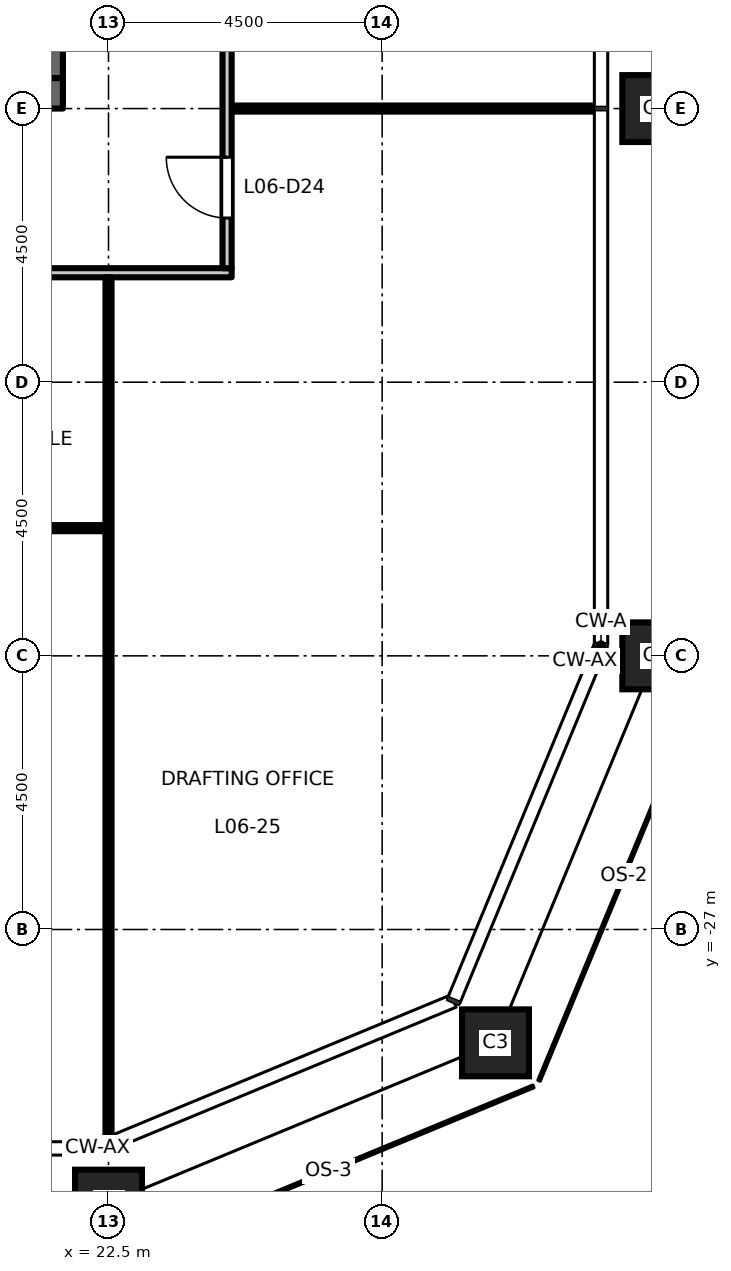
"""IFC4 building model, lengths in metres.
Left out: names, types, materials, properties, quantities, classifications, styles, units other than length and angle.
Written with IfcOpenShell. Run it as: python <this file> out.ifc"""

import sys

from ifc_helpers import new_model, si_unit, direction, frame, frame_2d, origin, origin_2d, place, context, subcontext, project, spatial, rectangle, hollow_rectangle, extrude, element, fill, save


model = new_model("IFC4")
c1 = context("Model", 3, precision=1e-05, world=origin(), true_north=direction((0.0, 1.0)))
c2 = subcontext(c1, "Body", "Model", "MODEL_VIEW")
j1 = project(units=[si_unit("LENGTHUNIT", "METRE"), si_unit("PLANEANGLEUNIT", "RADIAN")], contexts=[c1])
p1 = place(None, origin())
s1 = spatial("IfcSite", under=j1, at=p1, CompositionType="ELEMENT")
p2 = place(p1, origin())
s2 = spatial("IfcBuilding", under=s1, at=p2, CompositionType="ELEMENT")
p3 = place(p2, frame((0.0, 0.0, 31.2)))
s3 = spatial("IfcBuildingStorey", under=s2, at=p3, CompositionType="ELEMENT", Elevation=31.2)
for number, where, z_axis, x_axis in (
    (1, (22.5, -31.5, 0.0), (0.0, 0.0, 1.0), (1.0, 0.0, 0.0)),
    (2, (28.864, -28.864, 0.0), (0.0, 0.0, 1.0), (1.0, 0.0, 0.0)),
    (3, (31.5, -22.5, 0.0), (0.0, 0.0, 1.0), (1.0, 0.0, 0.0)),
    (4, (31.5, -13.5, 0.0), (0.0, 0.0, 1.0), (1.0, 0.0, 0.0)),
):
    element("IfcColumn", number, at=place(p3, frame(where, z_axis=z_axis, x_axis=x_axis)), inside=s3, PredefinedType="COLUMN", context=c2, shape_type="SweptSolid", body=[
        extrude(hollow_rectangle(XDim=1.1, YDim=1.1, WallThickness=0.07, at=origin_2d()), origin(), (0.0, 0.0, 1.0), 4.5),
    ])
p4 = place(p3, frame((21.5, -13.0, 0.0), z_axis=(0.0, 0.0, 1.0), x_axis=(0.0, 1.0, 0.0)))
e5 = element("IfcWall", 5, at=p4, inside=s3, PredefinedType="SHEAR", context=c2, shape_type="SweptSolid", body=[
    extrude(rectangle(XDim=26.0, YDim=0.5, at=frame_2d((13.0, 0.0))), origin(), (0.0, 0.0, 1.0), 4.35),
])
p5 = place(p4, frame((16.825, 0.0, 0.0)))
e6 = element("IfcOpeningElement", 6, at=p5, cuts=e5, PredefinedType="OPENING", context=c2, shape_type="SweptSolid", body=[
    extrude(rectangle(XDim=1.8, YDim=2.1, at=frame_2d((0.9, 1.05))), frame((0.0, 0.26, 0.0), z_axis=(0.0, -1.0, 0.0), x_axis=(1.0, 0.0, 0.0)), (0.0, 0.0, 1.0), 0.52),
])
p6 = place(p4, frame((7.375, 0.0, 0.0)))
e7 = element("IfcOpeningElement", 7, at=p6, cuts=e5, PredefinedType="OPENING", context=c2, shape_type="SweptSolid", body=[
    extrude(rectangle(XDim=1.8, YDim=2.1, at=frame_2d((0.9, 1.05))), frame((0.0, 0.26, 0.0), z_axis=(0.0, -1.0, 0.0), x_axis=(1.0, 0.0, 0.0)), (0.0, 0.0, 1.0), 0.52),
])
p7 = place(p4, frame((23.4, 0.0, 0.0)))
e8 = element("IfcOpeningElement", 8, at=p7, cuts=e5, PredefinedType="OPENING", context=c2, shape_type="SweptSolid", body=[
    extrude(rectangle(XDim=0.9, YDim=2.1, at=frame_2d((0.45, 1.05))), frame((0.0, 0.26, 0.0), z_axis=(0.0, -1.0, 0.0), x_axis=(1.0, 0.0, 0.0)), (0.0, 0.0, 1.0), 0.52),
])
p8 = place(p3, frame((8.25, -13.25, 0.0), z_axis=(0.0, 0.0, 1.0), x_axis=(1.0, 0.0, 0.0)))
e9 = element("IfcWall", 9, at=p8, inside=s3, PredefinedType="SHEAR", context=c2, shape_type="SweptSolid", body=[
    extrude(rectangle(XDim=13.5, YDim=0.5, at=frame_2d((6.75, 0.0))), origin(), (0.0, 0.0, 1.0), 4.35),
])
p9 = place(p3, frame((4.55, -20.4, 0.0), z_axis=(0.0, 0.0, 1.0), x_axis=(1.0, 0.0, 0.0)))
e10 = element("IfcWall", 10, at=p9, inside=s3, PredefinedType="PARTITIONING", context=c2, shape_type="SweptSolid", body=[
    extrude(rectangle(XDim=17.9, YDim=0.1, at=frame_2d((8.95, 0.0))), origin(), (0.0, 0.0, 1.0), 4.35),
])
p10 = place(p9, frame((3.85, 0.0, 0.0)))
e11 = element("IfcOpeningElement", 11, at=p10, cuts=e10, PredefinedType="OPENING", context=c2, shape_type="SweptSolid", body=[
    extrude(rectangle(XDim=1.0, YDim=2.1, at=frame_2d((0.5, 1.05))), frame((0.0, 0.06, 0.0), z_axis=(0.0, -1.0, 0.0), x_axis=(1.0, 0.0, 0.0)), (0.0, 0.0, 1.0), 0.12),
])
p11 = place(p9, frame((12.85, 0.0, 0.0)))
e12 = element("IfcOpeningElement", 12, at=p11, cuts=e10, PredefinedType="OPENING", context=c2, shape_type="SweptSolid", body=[
    extrude(rectangle(XDim=1.0, YDim=2.1, at=frame_2d((0.5, 1.05))), frame((0.0, 0.06, 0.0), z_axis=(0.0, -1.0, 0.0), x_axis=(1.0, 0.0, 0.0)), (0.0, 0.0, 1.0), 0.12),
])
p12 = place(p3, frame((-24.525, -16.2, 0.0), z_axis=(0.0, 0.0, 1.0), x_axis=(1.0, 0.0, 0.0)))
e13 = element("IfcWall", 13, at=p12, inside=s3, PredefinedType="PARTITIONING", context=c2, shape_type="SweptSolid", body=[
    extrude(rectangle(XDim=49.05, YDim=0.15, at=frame_2d((24.525, 0.0))), origin(), (0.0, 0.0, 1.0), 4.35),
])
p13 = place(p12, frame((5.925, 0.0, 0.0)))
e14 = element("IfcOpeningElement", 14, at=p13, cuts=e13, PredefinedType="OPENING", context=c2, shape_type="SweptSolid", body=[
    extrude(rectangle(XDim=1.0, YDim=2.1, at=frame_2d((0.5, 1.05))), frame((0.0, 0.085, 0.0), z_axis=(0.0, -1.0, 0.0), x_axis=(1.0, 0.0, 0.0)), (0.0, 0.0, 1.0), 0.17),
])
p14 = place(p12, frame((14.925, 0.0, 0.0)))
e15 = element("IfcOpeningElement", 15, at=p14, cuts=e13, PredefinedType="OPENING", context=c2, shape_type="SweptSolid", body=[
    extrude(rectangle(XDim=1.0, YDim=2.1, at=frame_2d((0.5, 1.05))), frame((0.0, 0.085, 0.0), z_axis=(0.0, -1.0, 0.0), x_axis=(1.0, 0.0, 0.0)), (0.0, 0.0, 1.0), 0.17),
])
p15 = place(p12, frame((23.925, 0.0, 0.0)))
e16 = element("IfcOpeningElement", 16, at=p15, cuts=e13, PredefinedType="OPENING", context=c2, shape_type="SweptSolid", body=[
    extrude(rectangle(XDim=1.0, YDim=2.1, at=frame_2d((0.5, 1.05))), frame((0.0, 0.085, 0.0), z_axis=(0.0, -1.0, 0.0), x_axis=(1.0, 0.0, 0.0)), (0.0, 0.0, 1.0), 0.17),
])
p16 = place(p12, frame((32.925, 0.0, 0.0)))
e17 = element("IfcOpeningElement", 17, at=p16, cuts=e13, PredefinedType="OPENING", context=c2, shape_type="SweptSolid", body=[
    extrude(rectangle(XDim=1.0, YDim=2.1, at=frame_2d((0.5, 1.05))), frame((0.0, 0.085, 0.0), z_axis=(0.0, -1.0, 0.0), x_axis=(1.0, 0.0, 0.0)), (0.0, 0.0, 1.0), 0.17),
])
p17 = place(p12, frame((41.925, 0.0, 0.0)))
e18 = element("IfcOpeningElement", 18, at=p17, cuts=e13, PredefinedType="OPENING", context=c2, shape_type="SweptSolid", body=[
    extrude(rectangle(XDim=1.0, YDim=2.1, at=frame_2d((0.5, 1.05))), frame((0.0, 0.085, 0.0), z_axis=(0.0, -1.0, 0.0), x_axis=(1.0, 0.0, 0.0)), (0.0, 0.0, 1.0), 0.17),
])
p18 = place(p3, frame((24.525, -13.5, 0.0), z_axis=(0.0, 0.0, 1.0), x_axis=(1.0, 0.0, 0.0)))
e19 = element("IfcWall", 19, at=p18, inside=s3, PredefinedType="PARTITIONING", context=c2, shape_type="SweptSolid", body=[
    extrude(rectangle(XDim=5.985, YDim=0.1, at=frame_2d((2.993, 0.0))), origin(), (0.0, 0.0, 1.0), 3.35),
])
p19 = place(p3, frame((22.5, -30.428, 0.0), z_axis=(0.0, 0.0, 1.0), x_axis=(0.0, 1.0, 0.0)))
e20 = element("IfcWall", 20, at=p19, inside=s3, PredefinedType="PARTITIONING", context=c2, shape_type="SweptSolid", body=[
    extrude(rectangle(XDim=14.153, YDim=0.1, at=frame_2d((7.077, 0.0))), origin(), (0.0, 0.0, 1.0), 3.35),
])
p20 = place(p3, frame((24.45, -16.125, 0.0), z_axis=(0.0, 0.0, 1.0), x_axis=(0.0, 1.0, 0.0)))
e21 = element("IfcWall", 21, at=p20, inside=s3, PredefinedType="PARTITIONING", context=c2, shape_type="SweptSolid", body=[
    extrude(rectangle(XDim=32.25, YDim=0.15, at=frame_2d((16.125, 0.0))), origin(), (0.0, 0.0, 1.0), 4.35),
])
p21 = place(p20, frame((30.525, 0.0, 0.0)))
e22 = element("IfcOpeningElement", 22, at=p21, cuts=e21, PredefinedType="OPENING", context=c2, shape_type="SweptSolid", body=[
    extrude(rectangle(XDim=1.0, YDim=2.1, at=frame_2d((0.5, 1.05))), frame((0.0, 0.085, 0.0), z_axis=(0.0, -1.0, 0.0), x_axis=(1.0, 0.0, 0.0)), (0.0, 0.0, 1.0), 0.17),
])
p22 = place(p20, frame((0.825, 0.0, 0.0)))
e23 = element("IfcOpeningElement", 23, at=p22, cuts=e21, PredefinedType="OPENING", context=c2, shape_type="SweptSolid", body=[
    extrude(rectangle(XDim=1.0, YDim=2.1, at=frame_2d((0.5, 1.05))), frame((0.0, 0.085, 0.0), z_axis=(0.0, -1.0, 0.0), x_axis=(1.0, 0.0, 0.0)), (0.0, 0.0, 1.0), 0.17),
])
p23 = place(p20, frame((6.525, 0.0, 0.0)))
e24 = element("IfcOpeningElement", 24, at=p23, cuts=e21, PredefinedType="OPENING", context=c2, shape_type="SweptSolid", body=[
    extrude(rectangle(XDim=1.0, YDim=2.1, at=frame_2d((0.5, 1.05))), frame((0.0, 0.085, 0.0), z_axis=(0.0, -1.0, 0.0), x_axis=(1.0, 0.0, 0.0)), (0.0, 0.0, 1.0), 0.17),
])
p24 = place(p20, frame((15.525, 0.0, 0.0)))
e25 = element("IfcOpeningElement", 25, at=p24, cuts=e21, PredefinedType="OPENING", context=c2, shape_type="SweptSolid", body=[
    extrude(rectangle(XDim=1.0, YDim=2.1, at=frame_2d((0.5, 1.05))), frame((0.0, 0.085, 0.0), z_axis=(0.0, -1.0, 0.0), x_axis=(1.0, 0.0, 0.0)), (0.0, 0.0, 1.0), 0.17),
])
p25 = place(p20, frame((24.525, 0.0, 0.0)))
e26 = element("IfcOpeningElement", 26, at=p25, cuts=e21, PredefinedType="OPENING", context=c2, shape_type="SweptSolid", body=[
    extrude(rectangle(XDim=1.0, YDim=2.1, at=frame_2d((0.5, 1.05))), frame((0.0, 0.085, 0.0), z_axis=(0.0, -1.0, 0.0), x_axis=(1.0, 0.0, 0.0)), (0.0, 0.0, 1.0), 0.17),
])
p26 = place(p22, origin())
e27 = element("IfcDoor", 27, at=p26, inside=s3, OperationType="SINGLE_SWING_RIGHT", PredefinedType="DOOR", context=c2, shape_type="SweptSolid", body=[
    extrude(rectangle(XDim=1.0, YDim=2.1, at=frame_2d((0.5, 1.05))), frame((0.0, 0.025, 0.0), z_axis=(0.0, -1.0, 0.0), x_axis=(1.0, 0.0, 0.0)), (0.0, 0.0, 1.0), 0.05),
])
fill(e23, e27)
save(model, sys.argv[1])
